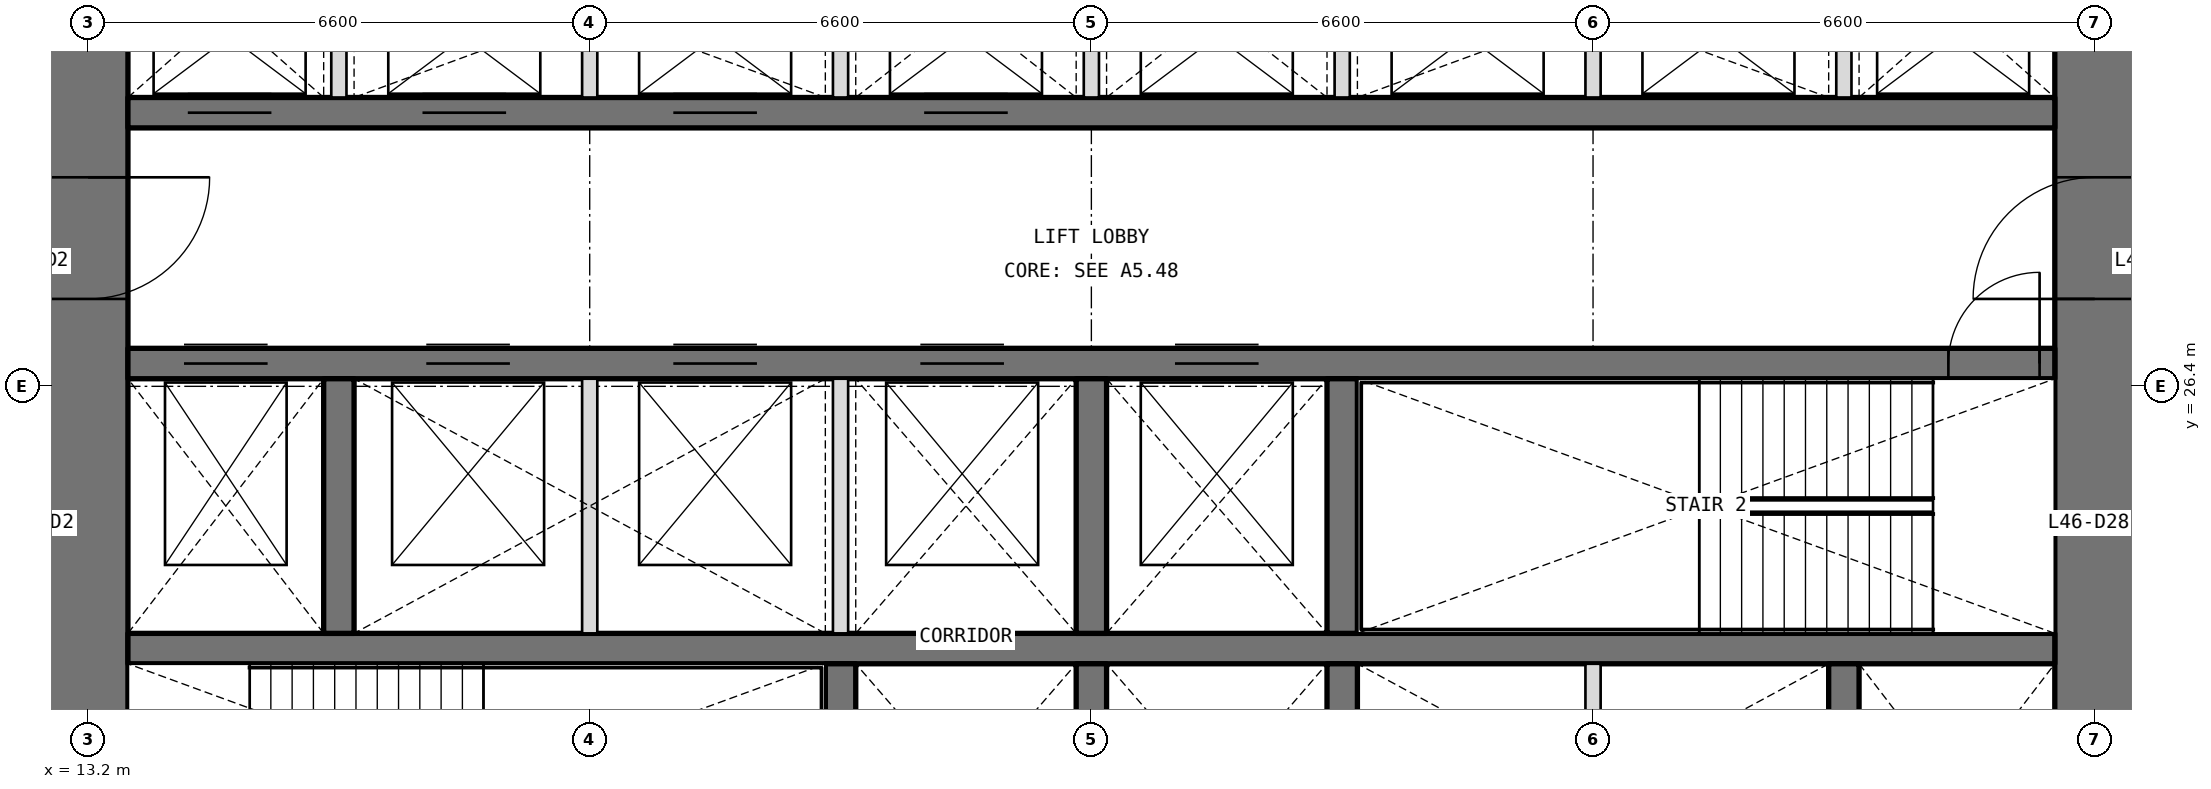
"""IFC4 building model, lengths in metres.
Left out: names, types, materials, properties, quantities, classifications, styles, units other than length and angle.
Written with IfcOpenShell. Run it as: python <this file> out.ifc"""

import sys

from ifc_helpers import new_model, si_unit, direction, frame, frame_2d, origin, place, context, subcontext, project, spatial, rectangle, extrude, element, fill, save


model = new_model("IFC4")
c1 = context("Model", 3, precision=1e-05, world=origin(), true_north=direction((0.0, 1.0)))
c2 = subcontext(c1, "Body", "Model", "MODEL_VIEW")
j1 = project(units=[si_unit("LENGTHUNIT", "METRE"), si_unit("PLANEANGLEUNIT", "RADIAN")], contexts=[c1])
p1 = place(None, origin())
s1 = spatial("IfcSite", under=j1, at=p1, CompositionType="ELEMENT")
p2 = place(p1, origin())
s2 = spatial("IfcBuilding", under=s1, at=p2, CompositionType="ELEMENT")
p3 = place(p2, frame((0.0, 0.0, 201.9)))
s3 = spatial("IfcBuildingStorey", under=s2, at=p3, CompositionType="ELEMENT", Elevation=201.9)
p4 = place(p3, frame((39.6, 13.725, 0.0), z_axis=(0.0, 0.0, 1.0), x_axis=(0.0, 1.0, 0.0)))
e1 = element("IfcWall", 1, at=p4, inside=s3, PredefinedType="SHEAR", context=c2, shape_type="SweptSolid", body=[
    extrude(rectangle(XDim=18.75, YDim=1.05, at=frame_2d((9.375, 0.0))), origin(), (0.0, 0.0, 1.0), 4.2),
])
p5 = place(p4, frame((3.025, 0.0, 0.0)))
e2 = element("IfcOpeningElement", 2, at=p5, cuts=e1, PredefinedType="OPENING", context=c2, shape_type="SweptSolid", body=[
    extrude(rectangle(XDim=1.6, YDim=2.1, at=frame_2d((0.8, 1.05))), frame((0.0, 0.535, 0.0), z_axis=(0.0, -1.0, 0.0), x_axis=(1.0, 0.0, 0.0)), (0.0, 0.0, 1.0), 1.07),
])
p6 = place(p4, frame((13.825, 0.0, 0.0)))
e3 = element("IfcOpeningElement", 3, at=p6, cuts=e1, PredefinedType="OPENING", context=c2, shape_type="SweptSolid", body=[
    extrude(rectangle(XDim=1.6, YDim=2.1, at=frame_2d((0.8, 1.05))), frame((0.0, 0.535, 0.0), z_axis=(0.0, -1.0, 0.0), x_axis=(1.0, 0.0, 0.0)), (0.0, 0.0, 1.0), 1.07),
])
p7 = place(p3, frame((13.2, 32.475, 0.0), z_axis=(0.0, 0.0, 1.0), x_axis=(0.0, -1.0, 0.0)))
e4 = element("IfcWall", 4, at=p7, inside=s3, PredefinedType="SHEAR", context=c2, shape_type="SweptSolid", body=[
    extrude(rectangle(XDim=18.75, YDim=1.05, at=frame_2d((9.375, 0.0))), origin(), (0.0, 0.0, 1.0), 4.2),
])
p8 = place(p7, frame((14.125, 0.0, 0.0)))
e5 = element("IfcOpeningElement", 5, at=p8, cuts=e4, PredefinedType="OPENING", context=c2, shape_type="SweptSolid", body=[
    extrude(rectangle(XDim=1.6, YDim=2.1, at=frame_2d((0.8, 1.05))), frame((0.0, 0.535, 0.0), z_axis=(0.0, -1.0, 0.0), x_axis=(1.0, 0.0, 0.0)), (0.0, 0.0, 1.0), 1.07),
])
p9 = place(p7, frame((3.325, 0.0, 0.0)))
e6 = element("IfcOpeningElement", 6, at=p9, cuts=e4, PredefinedType="OPENING", context=c2, shape_type="SweptSolid", body=[
    extrude(rectangle(XDim=1.6, YDim=2.1, at=frame_2d((0.8, 1.05))), frame((0.0, 0.535, 0.0), z_axis=(0.0, -1.0, 0.0), x_axis=(1.0, 0.0, 0.0)), (0.0, 0.0, 1.0), 1.07),
])
p10 = place(p3, frame((13.725, 22.95, 0.0), z_axis=(0.0, 0.0, 1.0), x_axis=(1.0, 0.0, 0.0)))
e7 = element("IfcWall", 7, at=p10, inside=s3, PredefinedType="SHEAR", context=c2, shape_type="SweptSolid", body=[
    extrude(rectangle(XDim=25.35, YDim=0.4, at=frame_2d((12.675, 0.0))), origin(), (0.0, 0.0, 1.0), 4.2),
])
p11 = place(p3, frame((13.725, 26.7, 0.0), z_axis=(0.0, 0.0, 1.0), x_axis=(1.0, 0.0, 0.0)))
e8 = element("IfcWall", 8, at=p11, inside=s3, PredefinedType="SHEAR", context=c2, shape_type="SweptSolid", body=[
    extrude(rectangle(XDim=25.35, YDim=0.4, at=frame_2d((12.675, 0.0))), origin(), (0.0, 0.0, 1.0), 4.2),
])
p12 = place(p11, frame((23.95, 0.0, 0.0)))
e9 = element("IfcOpeningElement", 9, at=p12, cuts=e8, PredefinedType="OPENING", context=c2, shape_type="SweptSolid", body=[
    extrude(rectangle(XDim=1.2, YDim=2.1, at=frame_2d((0.6, 1.05))), frame((0.0, 0.21, 0.0), z_axis=(0.0, -1.0, 0.0), x_axis=(1.0, 0.0, 0.0)), (0.0, 0.0, 1.0), 0.42),
])
p13 = place(p11, frame((0.738, 0.0, 0.0)))
e10 = element("IfcOpeningElement", 10, at=p13, cuts=e8, PredefinedType="OPENING", context=c2, shape_type="SweptSolid", body=[
    extrude(rectangle(XDim=1.1, YDim=2.1, at=frame_2d((0.55, 1.05))), frame((0.0, 0.21, 0.0), z_axis=(0.0, -1.0, 0.0), x_axis=(1.0, 0.0, 0.0)), (0.0, 0.0, 1.0), 0.42),
])
p14 = place(p11, frame((3.925, 0.0, 0.0)))
e11 = element("IfcOpeningElement", 11, at=p14, cuts=e8, PredefinedType="OPENING", context=c2, shape_type="SweptSolid", body=[
    extrude(rectangle(XDim=1.1, YDim=2.1, at=frame_2d((0.55, 1.05))), frame((0.0, 0.21, 0.0), z_axis=(0.0, -1.0, 0.0), x_axis=(1.0, 0.0, 0.0)), (0.0, 0.0, 1.0), 0.42),
])
p15 = place(p11, frame((7.175, 0.0, 0.0)))
e12 = element("IfcOpeningElement", 12, at=p15, cuts=e8, PredefinedType="OPENING", context=c2, shape_type="SweptSolid", body=[
    extrude(rectangle(XDim=1.1, YDim=2.1, at=frame_2d((0.55, 1.05))), frame((0.0, 0.21, 0.0), z_axis=(0.0, -1.0, 0.0), x_axis=(1.0, 0.0, 0.0)), (0.0, 0.0, 1.0), 0.42),
])
p16 = place(p11, frame((10.425, 0.0, 0.0)))
e13 = element("IfcOpeningElement", 13, at=p16, cuts=e8, PredefinedType="OPENING", context=c2, shape_type="SweptSolid", body=[
    extrude(rectangle(XDim=1.1, YDim=2.1, at=frame_2d((0.55, 1.05))), frame((0.0, 0.21, 0.0), z_axis=(0.0, -1.0, 0.0), x_axis=(1.0, 0.0, 0.0)), (0.0, 0.0, 1.0), 0.42),
])
p17 = place(p11, frame((13.775, 0.0, 0.0)))
e14 = element("IfcOpeningElement", 14, at=p17, cuts=e8, PredefinedType="OPENING", context=c2, shape_type="SweptSolid", body=[
    extrude(rectangle(XDim=1.1, YDim=2.1, at=frame_2d((0.55, 1.05))), frame((0.0, 0.21, 0.0), z_axis=(0.0, -1.0, 0.0), x_axis=(1.0, 0.0, 0.0)), (0.0, 0.0, 1.0), 0.42),
])
p18 = place(p3, frame((13.725, 30.0, 0.0), z_axis=(0.0, 0.0, 1.0), x_axis=(1.0, 0.0, 0.0)))
e15 = element("IfcWall", 15, at=p18, inside=s3, PredefinedType="SHEAR", context=c2, shape_type="SweptSolid", body=[
    extrude(rectangle(XDim=25.35, YDim=0.4, at=frame_2d((12.675, 0.0))), origin(), (0.0, 0.0, 1.0), 4.2),
])
p19 = place(p18, frame((0.788, 0.0, 0.0)))
e16 = element("IfcOpeningElement", 16, at=p19, cuts=e15, PredefinedType="OPENING", context=c2, shape_type="SweptSolid", body=[
    extrude(rectangle(XDim=1.1, YDim=2.1, at=frame_2d((0.55, 1.05))), frame((0.0, 0.21, 0.0), z_axis=(0.0, -1.0, 0.0), x_axis=(1.0, 0.0, 0.0)), (0.0, 0.0, 1.0), 0.42),
])
p20 = place(p18, frame((3.875, 0.0, 0.0)))
e17 = element("IfcOpeningElement", 17, at=p20, cuts=e15, PredefinedType="OPENING", context=c2, shape_type="SweptSolid", body=[
    extrude(rectangle(XDim=1.1, YDim=2.1, at=frame_2d((0.55, 1.05))), frame((0.0, 0.21, 0.0), z_axis=(0.0, -1.0, 0.0), x_axis=(1.0, 0.0, 0.0)), (0.0, 0.0, 1.0), 0.42),
])
p21 = place(p18, frame((7.175, 0.0, 0.0)))
e18 = element("IfcOpeningElement", 18, at=p21, cuts=e15, PredefinedType="OPENING", context=c2, shape_type="SweptSolid", body=[
    extrude(rectangle(XDim=1.1, YDim=2.1, at=frame_2d((0.55, 1.05))), frame((0.0, 0.21, 0.0), z_axis=(0.0, -1.0, 0.0), x_axis=(1.0, 0.0, 0.0)), (0.0, 0.0, 1.0), 0.42),
])
p22 = place(p18, frame((10.475, 0.0, 0.0)))
e19 = element("IfcOpeningElement", 19, at=p22, cuts=e15, PredefinedType="OPENING", context=c2, shape_type="SweptSolid", body=[
    extrude(rectangle(XDim=1.1, YDim=2.1, at=frame_2d((0.55, 1.05))), frame((0.0, 0.21, 0.0), z_axis=(0.0, -1.0, 0.0), x_axis=(1.0, 0.0, 0.0)), (0.0, 0.0, 1.0), 0.42),
])
for number, where, z_axis, x_axis in (
    (20, (23.1, 19.4, 0.0), (0.0, 0.0, 1.0), (0.0, 1.0, 0.0)),
    (21, (26.4, 19.4, 0.0), (0.0, 0.0, 1.0), (0.0, 1.0, 0.0)),
    (22, (29.7, 19.4, 0.0), (0.0, 0.0, 1.0), (0.0, 1.0, 0.0)),
    (23, (36.3, 19.4, 0.0), (0.0, 0.0, 1.0), (0.0, 1.0, 0.0)),
    (24, (16.5, 23.15, 0.0), (0.0, 0.0, 1.0), (0.0, 1.0, 0.0)),
    (25, (26.4, 23.15, 0.0), (0.0, 0.0, 1.0), (0.0, 1.0, 0.0)),
    (26, (29.7, 23.15, 0.0), (0.0, 0.0, 1.0), (0.0, 1.0, 0.0)),
):
    element("IfcWall", number, at=place(p3, frame(where, z_axis=z_axis, x_axis=x_axis)), inside=s3, PredefinedType="SHEAR", context=c2, shape_type="SweptSolid", body=[
        extrude(rectangle(XDim=3.35, YDim=0.4, at=frame_2d((1.675, 0.0))), origin(), (0.0, 0.0, 1.0), 4.2),
    ])
for number, where, z_axis, x_axis in (
    (27, (16.5, 30.2, 0.0), (0.0, 0.0, 1.0), (0.0, 1.0, 0.0)),
    (28, (19.8, 30.2, 0.0), (0.0, 0.0, 1.0), (0.0, 1.0, 0.0)),
    (29, (23.1, 30.2, 0.0), (0.0, 0.0, 1.0), (0.0, 1.0, 0.0)),
    (30, (26.4, 30.2, 0.0), (0.0, 0.0, 1.0), (0.0, 1.0, 0.0)),
    (31, (29.7, 30.2, 0.0), (0.0, 0.0, 1.0), (0.0, 1.0, 0.0)),
    (32, (33.0, 30.2, 0.0), (0.0, 0.0, 1.0), (0.0, 1.0, 0.0)),
    (33, (36.3, 30.2, 0.0), (0.0, 0.0, 1.0), (0.0, 1.0, 0.0)),
):
    element("IfcWall", number, at=place(p3, frame(where, z_axis=z_axis, x_axis=x_axis)), inside=s3, PredefinedType="PARTITIONING", context=c2, shape_type="SweptSolid", body=[
        extrude(rectangle(XDim=2.275, YDim=0.2, at=frame_2d((1.138, 0.0))), origin(), (0.0, 0.0, 1.0), 4.2),
    ])
for number, where, z_axis, x_axis in (
    (34, (33.0, 19.4, 0.0), (0.0, 0.0, 1.0), (0.0, 1.0, 0.0)),
    (35, (19.8, 23.15, 0.0), (0.0, 0.0, 1.0), (0.0, 1.0, 0.0)),
    (36, (23.1, 23.15, 0.0), (0.0, 0.0, 1.0), (0.0, 1.0, 0.0)),
):
    element("IfcWall", number, at=place(p3, frame(where, z_axis=z_axis, x_axis=x_axis)), inside=s3, PredefinedType="PARTITIONING", context=c2, shape_type="SweptSolid", body=[
        extrude(rectangle(XDim=3.35, YDim=0.2, at=frame_2d((1.675, 0.0))), origin(), (0.0, 0.0, 1.0), 4.2),
    ])
p23 = place(p12, origin())
e37 = element("IfcDoor", 37, at=p23, inside=s3, OperationType="SINGLE_SWING_RIGHT", PredefinedType="DOOR", context=c2, shape_type="SweptSolid", body=[
    extrude(rectangle(XDim=1.2, YDim=2.1, at=frame_2d((0.6, 1.05))), frame((0.0, 0.025, 0.0), z_axis=(0.0, -1.0, 0.0), x_axis=(1.0, 0.0, 0.0)), (0.0, 0.0, 1.0), 0.05),
])
fill(e9, e37)
p24 = place(p9, origin())
e38 = element("IfcDoor", 38, at=p24, inside=s3, OperationType="DOUBLE_DOOR_DOUBLE_SWING", PredefinedType="DOOR", context=c2, shape_type="SweptSolid", body=[
    extrude(rectangle(XDim=1.6, YDim=2.1, at=frame_2d((0.8, 1.05))), frame((0.0, 0.025, 0.0), z_axis=(0.0, -1.0, 0.0), x_axis=(1.0, 0.0, 0.0)), (0.0, 0.0, 1.0), 0.05),
])
fill(e6, e38)
p25 = place(p6, origin())
e39 = element("IfcDoor", 39, at=p25, inside=s3, OperationType="DOUBLE_DOOR_DOUBLE_SWING", PredefinedType="DOOR", context=c2, shape_type="SweptSolid", body=[
    extrude(rectangle(XDim=1.6, YDim=2.1, at=frame_2d((0.8, 1.05))), frame((0.0, 0.025, 0.0), z_axis=(0.0, -1.0, 0.0), x_axis=(1.0, 0.0, 0.0)), (0.0, 0.0, 1.0), 0.05),
])
fill(e3, e39)
p26 = place(p19, origin())
e40 = element("IfcDoor", 40, at=p26, inside=s3, OperationType="DOUBLE_DOOR_SLIDING", PredefinedType="DOOR", context=c2, shape_type="SweptSolid", body=[
    extrude(rectangle(XDim=1.1, YDim=2.1, at=frame_2d((0.55, 1.05))), frame((0.0, 0.025, 0.0), z_axis=(0.0, -1.0, 0.0), x_axis=(1.0, 0.0, 0.0)), (0.0, 0.0, 1.0), 0.05),
])
fill(e16, e40)
p27 = place(p20, origin())
e41 = element("IfcDoor", 41, at=p27, inside=s3, OperationType="DOUBLE_DOOR_SLIDING", PredefinedType="DOOR", context=c2, shape_type="SweptSolid", body=[
    extrude(rectangle(XDim=1.1, YDim=2.1, at=frame_2d((0.55, 1.05))), frame((0.0, 0.025, 0.0), z_axis=(0.0, -1.0, 0.0), x_axis=(1.0, 0.0, 0.0)), (0.0, 0.0, 1.0), 0.05),
])
fill(e17, e41)
p28 = place(p21, origin())
e42 = element("IfcDoor", 42, at=p28, inside=s3, OperationType="DOUBLE_DOOR_SLIDING", PredefinedType="DOOR", context=c2, shape_type="SweptSolid", body=[
    extrude(rectangle(XDim=1.1, YDim=2.1, at=frame_2d((0.55, 1.05))), frame((0.0, 0.025, 0.0), z_axis=(0.0, -1.0, 0.0), x_axis=(1.0, 0.0, 0.0)), (0.0, 0.0, 1.0), 0.05),
])
fill(e18, e42)
p29 = place(p22, origin())
e43 = element("IfcDoor", 43, at=p29, inside=s3, OperationType="DOUBLE_DOOR_SLIDING", PredefinedType="DOOR", context=c2, shape_type="SweptSolid", body=[
    extrude(rectangle(XDim=1.1, YDim=2.1, at=frame_2d((0.55, 1.05))), frame((0.0, 0.025, 0.0), z_axis=(0.0, -1.0, 0.0), x_axis=(1.0, 0.0, 0.0)), (0.0, 0.0, 1.0), 0.05),
])
fill(e19, e43)
p30 = place(p13, origin())
e44 = element("IfcDoor", 44, at=p30, inside=s3, OperationType="DOUBLE_DOOR_SLIDING", PredefinedType="DOOR", context=c2, shape_type="SweptSolid", body=[
    extrude(rectangle(XDim=1.1, YDim=2.1, at=frame_2d((0.55, 1.05))), frame((0.0, 0.025, 0.0), z_axis=(0.0, -1.0, 0.0), x_axis=(1.0, 0.0, 0.0)), (0.0, 0.0, 1.0), 0.05),
])
fill(e10, e44)
p31 = place(p14, origin())
e45 = element("IfcDoor", 45, at=p31, inside=s3, OperationType="DOUBLE_DOOR_SLIDING", PredefinedType="DOOR", context=c2, shape_type="SweptSolid", body=[
    extrude(rectangle(XDim=1.1, YDim=2.1, at=frame_2d((0.55, 1.05))), frame((0.0, 0.025, 0.0), z_axis=(0.0, -1.0, 0.0), x_axis=(1.0, 0.0, 0.0)), (0.0, 0.0, 1.0), 0.05),
])
fill(e11, e45)
p32 = place(p15, origin())
e46 = element("IfcDoor", 46, at=p32, inside=s3, OperationType="DOUBLE_DOOR_SLIDING", PredefinedType="DOOR", context=c2, shape_type="SweptSolid", body=[
    extrude(rectangle(XDim=1.1, YDim=2.1, at=frame_2d((0.55, 1.05))), frame((0.0, 0.025, 0.0), z_axis=(0.0, -1.0, 0.0), x_axis=(1.0, 0.0, 0.0)), (0.0, 0.0, 1.0), 0.05),
])
fill(e12, e46)
p33 = place(p16, origin())
e47 = element("IfcDoor", 47, at=p33, inside=s3, OperationType="DOUBLE_DOOR_SLIDING", PredefinedType="DOOR", context=c2, shape_type="SweptSolid", body=[
    extrude(rectangle(XDim=1.1, YDim=2.1, at=frame_2d((0.55, 1.05))), frame((0.0, 0.025, 0.0), z_axis=(0.0, -1.0, 0.0), x_axis=(1.0, 0.0, 0.0)), (0.0, 0.0, 1.0), 0.05),
])
fill(e13, e47)
p34 = place(p17, origin())
e48 = element("IfcDoor", 48, at=p34, inside=s3, OperationType="DOUBLE_DOOR_SLIDING", PredefinedType="DOOR", context=c2, shape_type="SweptSolid", body=[
    extrude(rectangle(XDim=1.1, YDim=2.1, at=frame_2d((0.55, 1.05))), frame((0.0, 0.025, 0.0), z_axis=(0.0, -1.0, 0.0), x_axis=(1.0, 0.0, 0.0)), (0.0, 0.0, 1.0), 0.05),
])
fill(e14, e48)
save(model, sys.argv[1])
